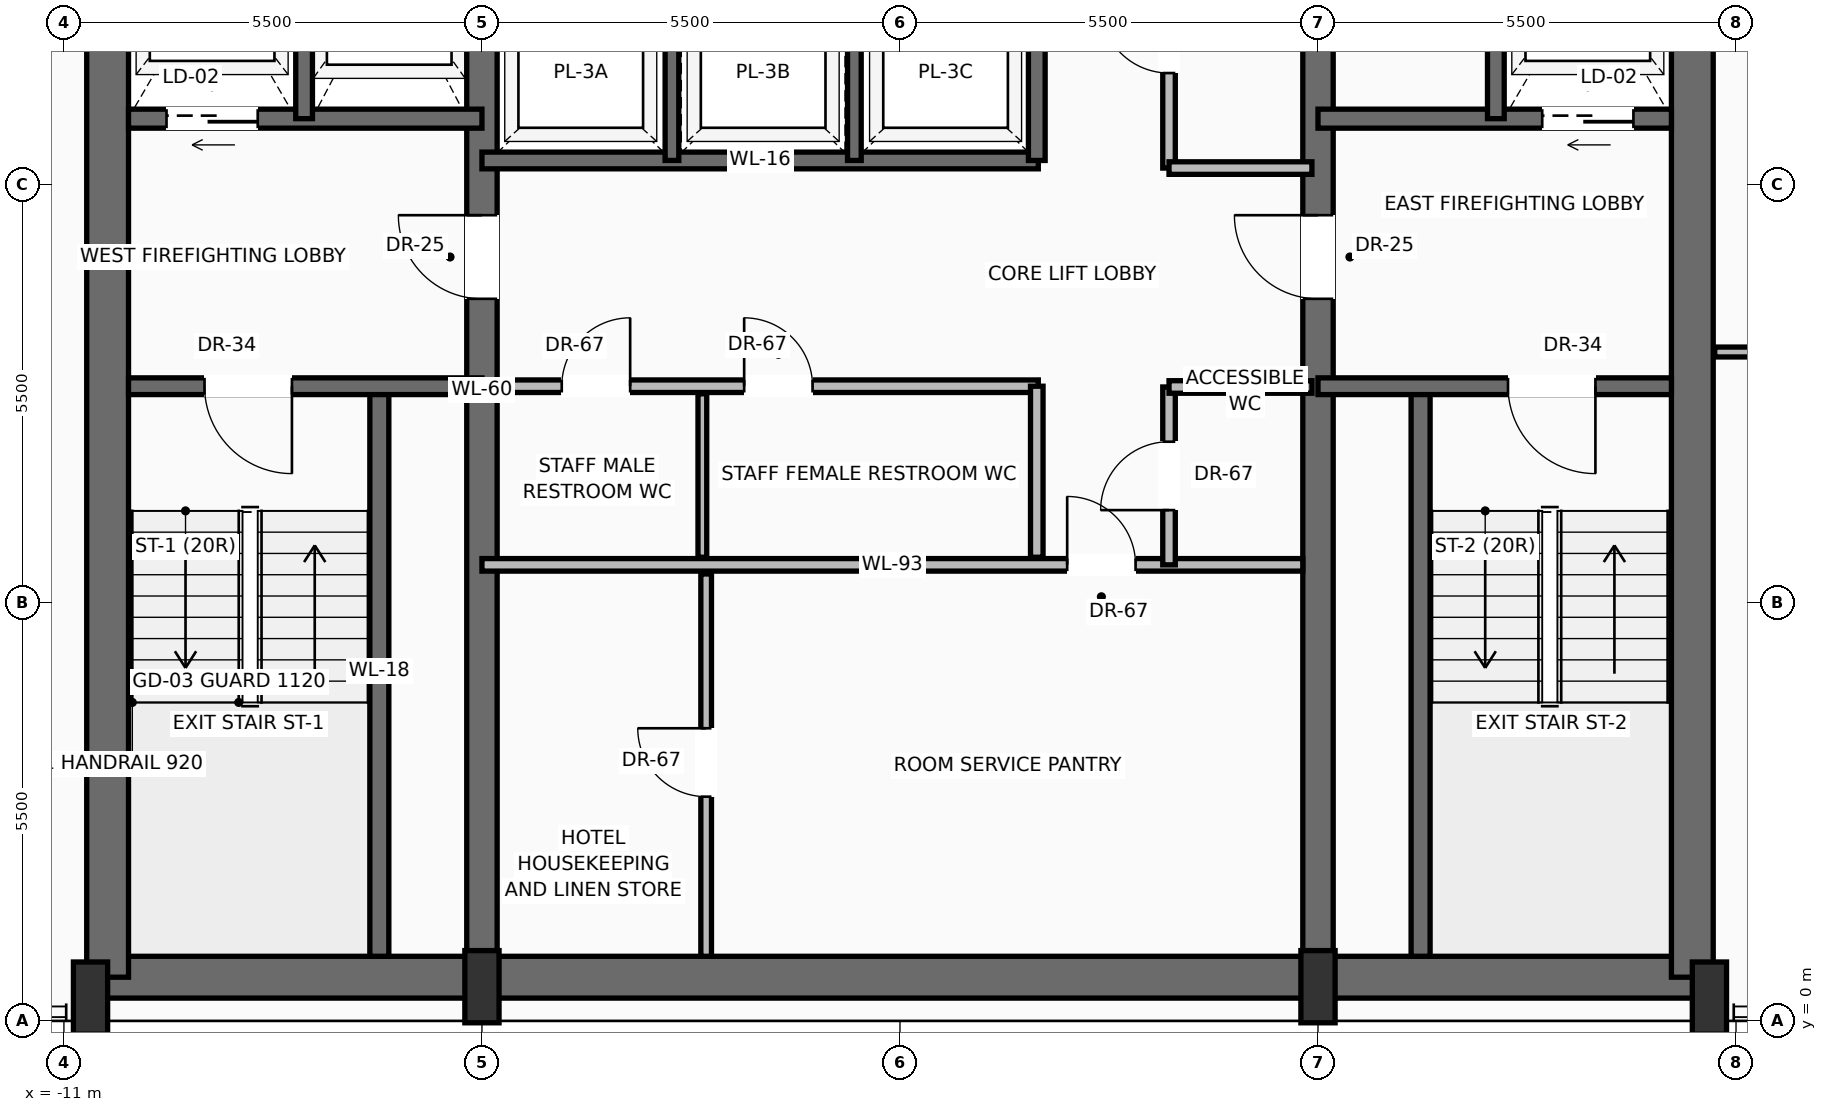
"""IFC4 building model, lengths in metres.
Left out: names, types, materials, properties, quantities, classifications, styles, units other than length and angle.
Written with IfcOpenShell. Run it as: python <this file> out.ifc"""

import sys

from ifc_helpers import new_model, si_unit, direction, frame, frame_2d, origin, origin_2d, place, context, subcontext, project, spatial, rectangle, extrude, source, transform, mapped, element, fill, save


model = new_model("IFC4")
c1 = context("Model", 3, precision=1e-05, world=origin(), true_north=direction((0.0, 1.0)))
c2 = subcontext(c1, "Body", "Model", "MODEL_VIEW")
j1 = project(units=[si_unit("LENGTHUNIT", "METRE"), si_unit("PLANEANGLEUNIT", "RADIAN")], contexts=[c1])
p1 = place(None, origin())
s1 = spatial("IfcSite", under=j1, at=p1, CompositionType="ELEMENT")
p2 = place(p1, origin())
s2 = spatial("IfcBuilding", under=s1, at=p2, CompositionType="ELEMENT")
p3 = place(p2, frame((0.0, 0.0, 247.6)))
s3 = spatial("IfcBuildingStorey", under=s2, at=p3, CompositionType="ELEMENT", Elevation=247.6)
p4 = place(p3, frame((-10.65, 0.575, 0.0), z_axis=(0.0, 0.0, 1.0), x_axis=(1.0, 0.0, 0.0)))
e1 = element("IfcWall", 1, at=p4, inside=s3, PredefinedType="SHEAR", context=c2, shape_type="SweptSolid", body=[
    extrude(rectangle(XDim=21.3, YDim=0.55, at=frame_2d((10.65, 0.0))), origin(), (0.0, 0.0, 1.0), 3.24),
])
for number, where, z_axis, x_axis in (
    (2, (-10.425, 0.575, 0.0), (0.0, 0.0, 1.0), (0.0, 1.0, 0.0)),
    (3, (10.425, 0.575, 0.0), (0.0, 0.0, 1.0), (0.0, 1.0, 0.0)),
):
    element("IfcWall", number, at=place(p3, frame(where, z_axis=z_axis, x_axis=x_axis)), inside=s3, PredefinedType="SHEAR", context=c2, shape_type="SweptSolid", body=[
        extrude(rectangle(XDim=15.45, YDim=0.55, at=frame_2d((7.725, 0.0))), origin(), (0.0, 0.0, 1.0), 3.24),
    ])
p5 = place(p3, frame((-5.5, 0.575, 0.0), z_axis=(0.0, 0.0, 1.0), x_axis=(0.0, 1.0, 0.0)))
e4 = element("IfcWall", 4, at=p5, inside=s3, PredefinedType="SHEAR", context=c2, shape_type="SweptSolid", body=[
    extrude(rectangle(XDim=15.45, YDim=0.4, at=frame_2d((7.725, 0.0))), origin(), (0.0, 0.0, 1.0), 3.24),
])
p6 = place(p5, frame((8.925, 0.0, 0.0)))
e5 = element("IfcOpeningElement", 5, at=p6, cuts=e4, PredefinedType="OPENING", context=c2, shape_type="SweptSolid", body=[
    extrude(rectangle(XDim=1.1, YDim=2.2, at=frame_2d((0.55, 1.1))), frame((0.0, 0.21, 0.0), z_axis=(0.0, -1.0, 0.0), x_axis=(1.0, 0.0, 0.0)), (0.0, 0.0, 1.0), 0.42),
])
p7 = place(p3, frame((5.5, 0.575, 0.0), z_axis=(0.0, 0.0, 1.0), x_axis=(0.0, 1.0, 0.0)))
e6 = element("IfcWall", 6, at=p7, inside=s3, PredefinedType="SHEAR", context=c2, shape_type="SweptSolid", body=[
    extrude(rectangle(XDim=15.45, YDim=0.4, at=frame_2d((7.725, 0.0))), origin(), (0.0, 0.0, 1.0), 3.24),
])
p8 = place(p7, frame((8.925, 0.0, 0.0)))
e7 = element("IfcOpeningElement", 7, at=p8, cuts=e6, PredefinedType="OPENING", context=c2, shape_type="SweptSolid", body=[
    extrude(rectangle(XDim=1.1, YDim=2.2, at=frame_2d((0.55, 1.1))), frame((0.0, 0.21, 0.0), z_axis=(0.0, -1.0, 0.0), x_axis=(1.0, 0.0, 0.0)), (0.0, 0.0, 1.0), 0.42),
])
m1 = source(origin(), c2, "Body", "SweptSolid", [
    extrude(rectangle(XDim=0.45, YDim=0.95, at=origin_2d()), origin(), (0.0, 0.0, 1.0), 3.45),
])
for number, where, z_axis, x_axis in (
    (8, (-10.65, 0.3, 0.0), (0.0, 0.0, 1.0), (1.0, 0.0, 0.0)),
    (9, (-5.5, 0.45, 0.0), (0.0, 0.0, 1.0), (1.0, 0.0, 0.0)),
    (10, (5.5, 0.45, 0.0), (0.0, 0.0, 1.0), (1.0, 0.0, 0.0)),
    (11, (10.65, 0.3, 0.0), (0.0, 0.0, 1.0), (1.0, 0.0, 0.0)),
):
    element("IfcColumn", number, at=place(p3, frame(where, z_axis=z_axis, x_axis=x_axis)), inside=s3, PredefinedType="PILASTER", context=c2, shape_type="MappedRepresentation", body=[
        mapped(m1, transform((0.0, 0.0, 0.0), scale=1.0)),
    ])
p9 = place(p3, frame((-6.85, 0.85, 0.0), z_axis=(0.0, 0.0, 1.0), x_axis=(0.0, 1.0, 0.0)))
e12 = element("IfcWall", 12, at=p9, inside=s3, PredefinedType="SOLIDWALL", context=c2, shape_type="SweptSolid", body=[
    extrude(rectangle(XDim=7.5, YDim=0.25, at=frame_2d((3.75, 0.0))), origin(), (0.0, 0.0, 1.0), 3.24),
])
p10 = place(p3, frame((-5.5, 8.35, 0.0), z_axis=(0.0, 0.0, 1.0), x_axis=(-1.0, 0.0, 0.0)))
e13 = element("IfcWall", 13, at=p10, inside=s3, PredefinedType="SOLIDWALL", context=c2, shape_type="SweptSolid", body=[
    extrude(rectangle(XDim=4.65, YDim=0.22, at=frame_2d((2.325, 0.0))), origin(), (0.0, 0.0, 1.0), 3.24),
])
p11 = place(p10, frame((2.5, 0.0, 0.0)))
e14 = element("IfcOpeningElement", 14, at=p11, cuts=e13, PredefinedType="OPENING", context=c2, shape_type="SweptSolid", body=[
    extrude(rectangle(XDim=1.15, YDim=2.2, at=frame_2d((0.575, 1.1))), frame((0.0, 0.12, 0.0), z_axis=(0.0, -1.0, 0.0), x_axis=(1.0, 0.0, 0.0)), (0.0, 0.0, 1.0), 0.24),
])
p12 = place(p3, frame((-5.5, 11.87, 0.0), z_axis=(0.0, 0.0, 1.0), x_axis=(-1.0, 0.0, 0.0)))
e15 = element("IfcWall", 15, at=p12, inside=s3, PredefinedType="SOLIDWALL", context=c2, shape_type="SweptSolid", body=[
    extrude(rectangle(XDim=4.65, YDim=0.25, at=frame_2d((2.325, 0.0))), origin(), (0.0, 0.0, 1.0), 3.24),
])
p13 = place(p12, frame((2.95, 0.0, 0.0)))
e16 = element("IfcOpeningElement", 16, at=p13, cuts=e15, PredefinedType="OPENING", context=c2, shape_type="SweptSolid", body=[
    extrude(rectangle(XDim=1.2, YDim=2.25, at=frame_2d((0.6, 1.125))), frame((0.0, 0.135, 0.0), z_axis=(0.0, -1.0, 0.0), x_axis=(1.0, 0.0, 0.0)), (0.0, 0.0, 1.0), 0.27),
])
p14 = place(p3, frame((-7.84, 11.87, 0.0), z_axis=(0.0, 0.0, 1.0), x_axis=(0.0, 1.0, 0.0)))
e17 = element("IfcWall", 17, at=p14, inside=s3, PredefinedType="SOLIDWALL", context=c2, shape_type="SweptSolid", body=[
    extrude(rectangle(XDim=3.88, YDim=0.22, at=frame_2d((1.94, 0.0))), origin(), (0.0, 0.0, 1.0), 3.24),
])
p15 = place(p3, frame((6.85, 0.85, 0.0), z_axis=(0.0, 0.0, 1.0), x_axis=(0.0, 1.0, 0.0)))
e18 = element("IfcWall", 18, at=p15, inside=s3, PredefinedType="SOLIDWALL", context=c2, shape_type="SweptSolid", body=[
    extrude(rectangle(XDim=7.5, YDim=0.25, at=frame_2d((3.75, 0.0))), origin(), (0.0, 0.0, 1.0), 3.24),
])
p16 = place(p3, frame((10.15, 8.35, 0.0), z_axis=(0.0, 0.0, 1.0), x_axis=(-1.0, 0.0, 0.0)))
e19 = element("IfcWall", 19, at=p16, inside=s3, PredefinedType="SOLIDWALL", context=c2, shape_type="SweptSolid", body=[
    extrude(rectangle(XDim=4.65, YDim=0.22, at=frame_2d((2.325, 0.0))), origin(), (0.0, 0.0, 1.0), 3.24),
])
p17 = place(p16, frame((1.0, 0.0, 0.0)))
e20 = element("IfcOpeningElement", 20, at=p17, cuts=e19, PredefinedType="OPENING", context=c2, shape_type="SweptSolid", body=[
    extrude(rectangle(XDim=1.15, YDim=2.2, at=frame_2d((0.575, 1.1))), frame((0.0, 0.12, 0.0), z_axis=(0.0, -1.0, 0.0), x_axis=(1.0, 0.0, 0.0)), (0.0, 0.0, 1.0), 0.24),
])
p18 = place(p3, frame((10.15, 11.87, 0.0), z_axis=(0.0, 0.0, 1.0), x_axis=(-1.0, 0.0, 0.0)))
e21 = element("IfcWall", 21, at=p18, inside=s3, PredefinedType="SOLIDWALL", context=c2, shape_type="SweptSolid", body=[
    extrude(rectangle(XDim=4.65, YDim=0.25, at=frame_2d((2.325, 0.0))), origin(), (0.0, 0.0, 1.0), 3.24),
])
p19 = place(p18, frame((0.5, 0.0, 0.0)))
e22 = element("IfcOpeningElement", 22, at=p19, cuts=e21, PredefinedType="OPENING", context=c2, shape_type="SweptSolid", body=[
    extrude(rectangle(XDim=1.2, YDim=2.25, at=frame_2d((0.6, 1.125))), frame((0.0, 0.135, 0.0), z_axis=(0.0, -1.0, 0.0), x_axis=(1.0, 0.0, 0.0)), (0.0, 0.0, 1.0), 0.27),
])
p20 = place(p3, frame((7.84, 11.87, 0.0), z_axis=(0.0, 0.0, 1.0), x_axis=(0.0, 1.0, 0.0)))
e23 = element("IfcWall", 23, at=p20, inside=s3, PredefinedType="SOLIDWALL", context=c2, shape_type="SweptSolid", body=[
    extrude(rectangle(XDim=3.88, YDim=0.22, at=frame_2d((1.94, 0.0))), origin(), (0.0, 0.0, 1.0), 3.24),
])
p21 = place(p3, frame((-5.5, 6.0, 0.0), z_axis=(0.0, 0.0, 1.0), x_axis=(1.0, 0.0, 0.0)))
e24 = element("IfcWall", 24, at=p21, inside=s3, PredefinedType="PARTITIONING", context=c2, shape_type="SweptSolid", body=[
    extrude(rectangle(XDim=10.8, YDim=0.165, at=frame_2d((5.4, 0.0))), origin(), (0.0, 0.0, 1.0), 3.232),
])
p22 = place(p21, frame((7.7, 0.0, 0.0)))
e25 = element("IfcOpeningElement", 25, at=p22, cuts=e24, PredefinedType="OPENING", context=c2, shape_type="SweptSolid", body=[
    extrude(rectangle(XDim=0.9, YDim=2.1, at=frame_2d((0.45, 1.05))), frame((0.0, 0.093, 0.0), z_axis=(0.0, -1.0, 0.0), x_axis=(1.0, 0.0, 0.0)), (0.0, 0.0, 1.0), 0.185),
])
p23 = place(p3, frame((-2.55, 0.85, 0.0), z_axis=(0.0, 0.0, 1.0), x_axis=(0.0, 1.0, 0.0)))
e26 = element("IfcWall", 26, at=p23, inside=s3, PredefinedType="PARTITIONING", context=c2, shape_type="SweptSolid", body=[
    extrude(rectangle(XDim=5.03, YDim=0.14, at=frame_2d((2.515, 0.0))), origin(), (0.0, 0.0, 1.0), 3.232),
])
p24 = place(p23, frame((2.1, 0.0, 0.0)))
e27 = element("IfcOpeningElement", 27, at=p24, cuts=e26, PredefinedType="OPENING", context=c2, shape_type="SweptSolid", body=[
    extrude(rectangle(XDim=0.9, YDim=2.1, at=frame_2d((0.45, 1.05))), frame((0.0, 0.08, 0.0), z_axis=(0.0, -1.0, 0.0), x_axis=(1.0, 0.0, 0.0)), (0.0, 0.0, 1.0), 0.16),
])
p25 = place(p3, frame((3.54, 6.0, 0.0), z_axis=(0.0, 0.0, 1.0), x_axis=(0.0, 1.0, 0.0)))
e28 = element("IfcWall", 28, at=p25, inside=s3, PredefinedType="PARTITIONING", context=c2, shape_type="SweptSolid", body=[
    extrude(rectangle(XDim=2.34, YDim=0.165, at=frame_2d((1.17, 0.0))), origin(), (0.0, 0.0, 1.0), 3.232),
])
p26 = place(p25, frame((0.72, 0.0, 0.0)))
e29 = element("IfcOpeningElement", 29, at=p26, cuts=e28, PredefinedType="OPENING", context=c2, shape_type="SweptSolid", body=[
    extrude(rectangle(XDim=0.9, YDim=2.1, at=frame_2d((0.45, 1.05))), frame((0.0, 0.093, 0.0), z_axis=(0.0, -1.0, 0.0), x_axis=(1.0, 0.0, 0.0)), (0.0, 0.0, 1.0), 0.185),
])
p27 = place(p3, frame((3.54, 8.34, 0.0), z_axis=(0.0, 0.0, 1.0), x_axis=(1.0, 0.0, 0.0)))
e30 = element("IfcWall", 30, at=p27, inside=s3, PredefinedType="PARTITIONING", context=c2, shape_type="SweptSolid", body=[
    extrude(rectangle(XDim=1.88, YDim=0.165, at=frame_2d((0.94, 0.0))), origin(), (0.0, 0.0, 1.0), 3.232),
])
p28 = place(p3, frame((-5.3, 8.35, 0.0), z_axis=(0.0, 0.0, 1.0), x_axis=(1.0, 0.0, 0.0)))
e31 = element("IfcWall", 31, at=p28, inside=s3, PredefinedType="PARTITIONING", context=c2, shape_type="SweptSolid", body=[
    extrude(rectangle(XDim=7.12, YDim=0.165, at=frame_2d((3.56, 0.0))), origin(), (0.0, 0.0, 1.0), 3.232),
])
p29 = place(p28, frame((0.85, 0.0, 0.0)))
e32 = element("IfcOpeningElement", 32, at=p29, cuts=e31, PredefinedType="OPENING", context=c2, shape_type="SweptSolid", body=[
    extrude(rectangle(XDim=0.9, YDim=2.1, at=frame_2d((0.45, 1.05))), frame((0.0, 0.093, 0.0), z_axis=(0.0, -1.0, 0.0), x_axis=(1.0, 0.0, 0.0)), (0.0, 0.0, 1.0), 0.185),
])
p30 = place(p28, frame((3.25, 0.0, 0.0)))
e33 = element("IfcOpeningElement", 33, at=p30, cuts=e31, PredefinedType="OPENING", context=c2, shape_type="SweptSolid", body=[
    extrude(rectangle(XDim=0.9, YDim=2.1, at=frame_2d((0.45, 1.05))), frame((0.0, 0.093, 0.0), z_axis=(0.0, -1.0, 0.0), x_axis=(1.0, 0.0, 0.0)), (0.0, 0.0, 1.0), 0.185),
])
p31 = place(p3, frame((1.8, 6.1, 0.0), z_axis=(0.0, 0.0, 1.0), x_axis=(0.0, 1.0, 0.0)))
e34 = element("IfcWall", 34, at=p31, inside=s3, PredefinedType="PARTITIONING", context=c2, shape_type="SweptSolid", body=[
    extrude(rectangle(XDim=2.25, YDim=0.165, at=frame_2d((1.125, 0.0))), origin(), (0.0, 0.0, 1.0), 3.232),
])
p32 = place(p3, frame((-2.6, 6.1, 0.0), z_axis=(0.0, 0.0, 1.0), x_axis=(0.0, 1.0, 0.0)))
e35 = element("IfcWall", 35, at=p32, inside=s3, PredefinedType="PARTITIONING", context=c2, shape_type="SweptSolid", body=[
    extrude(rectangle(XDim=2.15, YDim=0.115, at=frame_2d((1.075, 0.0))), origin(), (0.0, 0.0, 1.0), 3.232),
])
p33 = place(p3, frame((-5.5, 11.32, 0.0), z_axis=(0.0, 0.0, 1.0), x_axis=(1.0, 0.0, 0.0)))
e36 = element("IfcWall", 36, at=p33, inside=s3, PredefinedType="SOLIDWALL", context=c2, shape_type="SweptSolid", body=[
    extrude(rectangle(XDim=7.32, YDim=0.22, at=frame_2d((3.66, 0.0))), origin(), (0.0, 0.0, 1.0), 3.24),
])
p34 = place(p3, frame((1.8, 11.32, 0.0), z_axis=(0.0, 0.0, 1.0), x_axis=(0.0, 1.0, 0.0)))
e37 = element("IfcWall", 37, at=p34, inside=s3, PredefinedType="SOLIDWALL", context=c2, shape_type="SweptSolid", body=[
    extrude(rectangle(XDim=2.3, YDim=0.22, at=frame_2d((1.15, 0.0))), origin(), (0.0, 0.0, 1.0), 3.24),
])
for number, where, z_axis, x_axis in (
    (38, (-3.0, 11.32, 0.0), (0.0, 0.0, 1.0), (0.0, 1.0, 0.0)),
    (39, (-0.6, 11.32, 0.0), (0.0, 0.0, 1.0), (0.0, 1.0, 0.0)),
):
    element("IfcWall", number, at=place(p3, frame(where, z_axis=z_axis, x_axis=x_axis)), inside=s3, PredefinedType="SOLIDWALL", context=c2, shape_type="SweptSolid", body=[
        extrude(rectangle(XDim=2.3, YDim=0.18, at=frame_2d((1.15, 0.0))), origin(), (0.0, 0.0, 1.0), 3.24),
    ])
p35 = place(p3, frame((3.54, 11.22, 0.0), z_axis=(0.0, 0.0, 1.0), x_axis=(0.0, 1.0, 0.0)))
e40 = element("IfcWall", 40, at=p35, inside=s3, PredefinedType="PARTITIONING", context=c2, shape_type="SweptSolid", body=[
    extrude(rectangle(XDim=4.53, YDim=0.165, at=frame_2d((2.265, 0.0))), origin(), (0.0, 0.0, 1.0), 3.232),
])
p36 = place(p35, frame((1.25, 0.0, 0.0)))
e41 = element("IfcOpeningElement", 41, at=p36, cuts=e40, PredefinedType="OPENING", context=c2, shape_type="SweptSolid", body=[
    extrude(rectangle(XDim=0.9, YDim=2.1, at=frame_2d((0.45, 1.05))), frame((0.0, 0.093, 0.0), z_axis=(0.0, -1.0, 0.0), x_axis=(1.0, 0.0, 0.0)), (0.0, 0.0, 1.0), 0.185),
])
p37 = place(p3, frame((3.54, 11.22, 0.0), z_axis=(0.0, 0.0, 1.0), x_axis=(1.0, 0.0, 0.0)))
e42 = element("IfcWall", 42, at=p37, inside=s3, PredefinedType="PARTITIONING", context=c2, shape_type="SweptSolid", body=[
    extrude(rectangle(XDim=1.88, YDim=0.165, at=frame_2d((0.94, 0.0))), origin(), (0.0, 0.0, 1.0), 3.232),
])
p38 = place(p3, frame((10.72, 8.8, 0.0), z_axis=(0.0, 0.0, 1.0), x_axis=(1.0, 0.0, 0.0)))
e43 = element("IfcWall", 43, at=p38, inside=s3, PredefinedType="PARTITIONING", context=c2, shape_type="SweptSolid", body=[
    extrude(rectangle(XDim=11.96, YDim=0.13, at=frame_2d((5.98, 0.0))), origin(), (0.0, 0.0, 1.0), 3.232),
])
p39 = place(p38, frame((4.941, 0.0, 0.0)))
e44 = element("IfcOpeningElement", 44, at=p39, cuts=e43, PredefinedType="OPENING", context=c2, shape_type="SweptSolid", body=[
    extrude(rectangle(XDim=0.95, YDim=2.2, at=frame_2d((0.475, 1.1))), frame((0.0, 0.075, 0.0), z_axis=(0.0, -1.0, 0.0), x_axis=(1.0, 0.0, 0.0)), (0.0, 0.0, 1.0), 0.15),
])
m2 = source(origin(), c2, "Body", "SweptSolid", [
    extrude(rectangle(XDim=1.15, YDim=2.2, at=frame_2d((0.575, 1.1))), frame((0.0, 0.025, 0.0), z_axis=(0.0, -1.0, 0.0), x_axis=(1.0, 0.0, 0.0)), (0.0, 0.0, 1.0), 0.05),
])
p40 = place(p11, origin())
e45 = element("IfcDoor", 45, at=p40, inside=s3, OperationType="SINGLE_SWING_LEFT", PredefinedType="DOOR", context=c2, shape_type="MappedRepresentation", body=[
    mapped(m2, transform((0.0, 0.0, 0.0), scale=1.0)),
])
fill(e14, e45)
m3 = source(origin(), c2, "Body", "SweptSolid", [
    extrude(rectangle(XDim=1.1, YDim=2.2, at=frame_2d((0.55, 1.1))), frame((0.0, 0.025, 0.0), z_axis=(0.0, -1.0, 0.0), x_axis=(1.0, 0.0, 0.0)), (0.0, 0.0, 1.0), 0.05),
])
p41 = place(p6, origin())
e46 = element("IfcDoor", 46, at=p41, inside=s3, OperationType="SINGLE_SWING_RIGHT", PredefinedType="DOOR", context=c2, shape_type="MappedRepresentation", body=[
    mapped(m3, transform((0.0, 0.0, 0.0), scale=1.0)),
])
fill(e5, e46)
m4 = source(origin(), c2, "Body", "SweptSolid", [
    extrude(rectangle(XDim=1.2, YDim=2.25, at=frame_2d((0.6, 1.125))), frame((0.0, 0.025, 0.0), z_axis=(0.0, -1.0, 0.0), x_axis=(1.0, 0.0, 0.0)), (0.0, 0.0, 1.0), 0.05),
])
p42 = place(p13, origin())
e47 = element("IfcDoor", 47, at=p42, inside=s3, OperationType="SLIDING_TO_LEFT", PredefinedType="DOOR", context=c2, shape_type="MappedRepresentation", body=[
    mapped(m4, transform((0.0, 0.0, 0.0), scale=1.0)),
])
fill(e16, e47)
p43 = place(p17, origin())
e48 = element("IfcDoor", 48, at=p43, inside=s3, OperationType="SINGLE_SWING_LEFT", PredefinedType="DOOR", context=c2, shape_type="MappedRepresentation", body=[
    mapped(m2, transform((0.0, 0.0, 0.0), scale=1.0)),
])
fill(e20, e48)
p44 = place(p8, origin())
e49 = element("IfcDoor", 49, at=p44, inside=s3, OperationType="SINGLE_SWING_RIGHT", PredefinedType="DOOR", context=c2, shape_type="MappedRepresentation", body=[
    mapped(m3, transform((0.0, 0.0, 0.0), scale=1.0)),
])
fill(e7, e49)
p45 = place(p19, origin())
e50 = element("IfcDoor", 50, at=p45, inside=s3, OperationType="SLIDING_TO_RIGHT", PredefinedType="DOOR", context=c2, shape_type="MappedRepresentation", body=[
    mapped(m4, transform((0.0, 0.0, 0.0), scale=1.0)),
])
fill(e22, e50)
m5 = source(origin(), c2, "Body", "SweptSolid", [
    extrude(rectangle(XDim=0.9, YDim=2.1, at=frame_2d((0.45, 1.05))), frame((0.0, 0.025, 0.0), z_axis=(0.0, -1.0, 0.0), x_axis=(1.0, 0.0, 0.0)), (0.0, 0.0, 1.0), 0.05),
])
p46 = place(p22, origin())
e51 = element("IfcDoor", 51, at=p46, inside=s3, OperationType="SINGLE_SWING_LEFT", PredefinedType="DOOR", context=c2, shape_type="MappedRepresentation", body=[
    mapped(m5, transform((0.0, 0.0, 0.0), scale=1.0)),
])
fill(e25, e51)
p47 = place(p24, origin())
e52 = element("IfcDoor", 52, at=p47, inside=s3, OperationType="SINGLE_SWING_RIGHT", PredefinedType="DOOR", context=c2, shape_type="MappedRepresentation", body=[
    mapped(m5, transform((0.0, 0.0, 0.0), scale=1.0)),
])
fill(e27, e52)
p48 = place(p26, origin())
e53 = element("IfcDoor", 53, at=p48, inside=s3, OperationType="SINGLE_SWING_LEFT", PredefinedType="DOOR", context=c2, shape_type="MappedRepresentation", body=[
    mapped(m5, transform((0.0, 0.0, 0.0), scale=1.0)),
])
fill(e29, e53)
p49 = place(p29, origin())
e54 = element("IfcDoor", 54, at=p49, inside=s3, OperationType="SINGLE_SWING_RIGHT", PredefinedType="DOOR", context=c2, shape_type="MappedRepresentation", body=[
    mapped(m5, transform((0.0, 0.0, 0.0), scale=1.0)),
])
fill(e32, e54)
p50 = place(p30, origin())
e55 = element("IfcDoor", 55, at=p50, inside=s3, OperationType="SINGLE_SWING_LEFT", PredefinedType="DOOR", context=c2, shape_type="MappedRepresentation", body=[
    mapped(m5, transform((0.0, 0.0, 0.0), scale=1.0)),
])
fill(e33, e55)
p51 = place(p36, origin())
e56 = element("IfcDoor", 56, at=p51, inside=s3, OperationType="SINGLE_SWING_RIGHT", PredefinedType="DOOR", context=c2, shape_type="MappedRepresentation", body=[
    mapped(m5, transform((0.0, 0.0, 0.0), scale=1.0)),
])
fill(e41, e56)
save(model, sys.argv[1])
